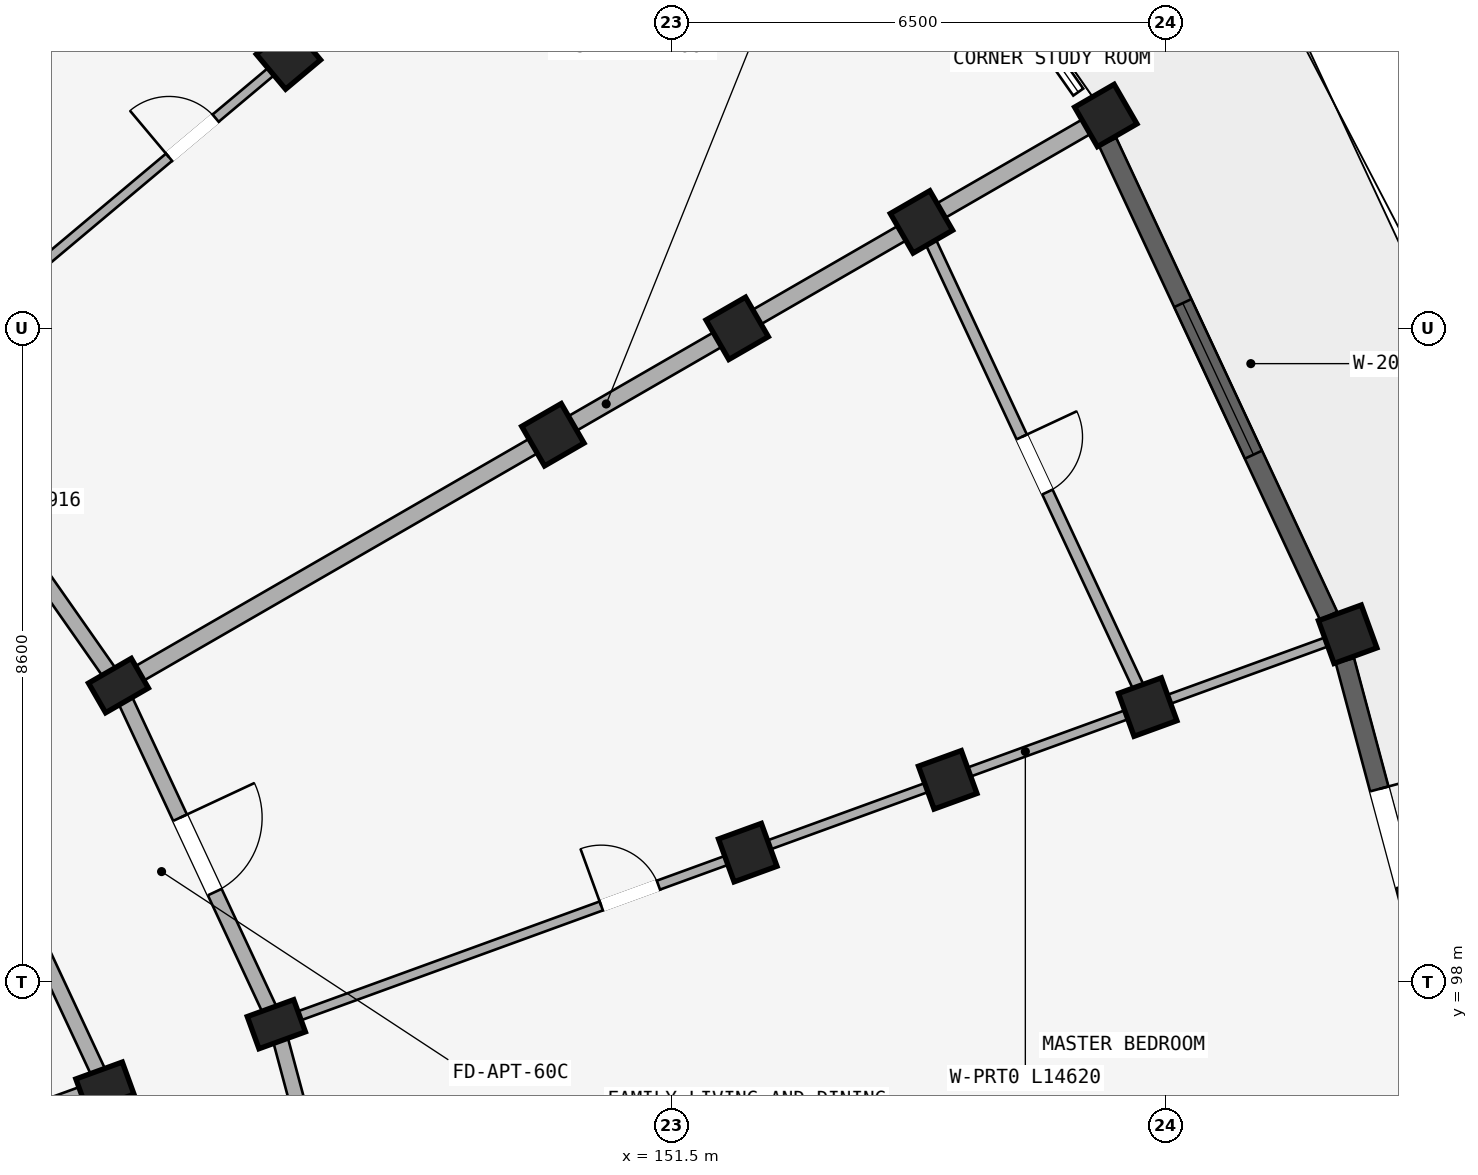
"""IFC4 building model, lengths in metres.
Left out: names, types, materials, properties, quantities, classifications, styles, units other than length and angle.
Written with IfcOpenShell. Run it as: python <this file> out.ifc"""

import sys

from ifc_helpers import new_model, si_unit, direction, frame, frame_2d, origin, origin_2d, place, context, subcontext, project, spatial, rectangle, extrude, element, fill, save


model = new_model("IFC4")
c1 = context("Model", 3, precision=1e-05, world=origin(), true_north=direction((0.0, 1.0)))
c2 = subcontext(c1, "Body", "Model", "MODEL_VIEW")
j1 = project(units=[si_unit("LENGTHUNIT", "METRE"), si_unit("PLANEANGLEUNIT", "RADIAN")], contexts=[c1])
p1 = place(None, origin())
s1 = spatial("IfcSite", under=j1, at=p1, CompositionType="ELEMENT")
p2 = place(p1, origin())
s2 = spatial("IfcBuilding", under=s1, at=p2, CompositionType="ELEMENT")
p3 = place(p2, frame((0.0, 0.0, 30.75)))
s3 = spatial("IfcBuildingStorey", under=s2, at=p3, CompositionType="ELEMENT", Elevation=30.75)
p4 = place(p3, frame((146.458, 110.169, 0.0), z_axis=(0.0, 0.0, 1.0), x_axis=(-0.642787609687, 0.766044443119, 0.0)))
e1 = element("IfcColumn", 1, at=p4, inside=s3, PredefinedType="COLUMN", context=c2, shape_type="SweptSolid", body=[
    extrude(rectangle(XDim=0.6, YDim=0.6, at=origin_2d()), origin(), (0.0, 0.0, 1.0), 2.93),
])
p5 = place(p3, frame((144.222, 101.9, 0.0), z_axis=(0.0, 0.0, 1.0), x_axis=(-0.5, 0.866025403784, 0.0)))
e2 = element("IfcColumn", 2, at=p5, inside=s3, PredefinedType="COLUMN", context=c2, shape_type="SweptSolid", body=[
    extrude(rectangle(XDim=0.45, YDim=0.65, at=origin_2d()), origin(), (0.0, 0.0, 1.0), 2.93),
])
for number, where, z_axis, x_axis in (
    (3, (149.938, 105.2, 0.0), (0.0, 0.0, 1.0), (-0.5, 0.866, 0.0)),
    (4, (152.363, 106.6, 0.0), (0.0, 0.0, 1.0), (-0.5, 0.866, 0.0)),
    (5, (154.787, 108.0, 0.0), (0.0, 0.0, 1.0), (-0.5, 0.866, 0.0)),
):
    element("IfcColumn", number, at=place(p3, frame(where, z_axis=z_axis, x_axis=x_axis)), inside=s3, PredefinedType="COLUMN", context=c2, shape_type="SweptSolid", body=[
        extrude(rectangle(XDim=0.6, YDim=0.6, at=origin_2d()), origin(), (0.0, 0.0, 1.0), 2.93),
    ])
p6 = place(p3, frame((157.212, 109.4, 0.0), z_axis=(0.0, 0.0, 1.0), x_axis=(-0.5, 0.866025403784, 0.0)))
e6 = element("IfcColumn", 6, at=p6, inside=s3, PredefinedType="COLUMN", context=c2, shape_type="SweptSolid", body=[
    extrude(rectangle(XDim=0.6, YDim=0.6, at=origin_2d()), origin(), (0.0, 0.0, 1.0), 2.97),
])
for number, where, z_axis, x_axis in (
    (7, (144.044, 96.624, 0.0), (0.0, 0.0, 1.0), (-0.342, 0.94, 0.0)),
    (8, (146.299, 97.445, 0.0), (0.0, 0.0, 1.0), (-0.342, 0.94, 0.0)),
):
    element("IfcColumn", number, at=place(p3, frame(where, z_axis=z_axis, x_axis=x_axis)), inside=s3, PredefinedType="COLUMN", context=c2, shape_type="SweptSolid", body=[
        extrude(rectangle(XDim=0.45, YDim=0.65, at=origin_2d()), origin(), (0.0, 0.0, 1.0), 2.93),
    ])
for number, where, z_axis, x_axis in (
    (9, (152.501, 99.702, 0.0), (0.0, 0.0, 1.0), (-0.342, 0.94, 0.0)),
    (10, (155.132, 100.66, 0.0), (0.0, 0.0, 1.0), (-0.342, 0.94, 0.0)),
    (11, (157.764, 101.618, 0.0), (0.0, 0.0, 1.0), (-0.342, 0.94, 0.0)),
):
    element("IfcColumn", number, at=place(p3, frame(where, z_axis=z_axis, x_axis=x_axis)), inside=s3, PredefinedType="COLUMN", context=c2, shape_type="SweptSolid", body=[
        extrude(rectangle(XDim=0.6, YDim=0.6, at=origin_2d()), origin(), (0.0, 0.0, 1.0), 2.93),
    ])
p7 = place(p3, frame((160.395, 102.575, 0.0), z_axis=(0.0, 0.0, 1.0), x_axis=(-0.342020143326, 0.939692620786, 0.0)))
e12 = element("IfcColumn", 12, at=p7, inside=s3, PredefinedType="COLUMN", context=c2, shape_type="SweptSolid", body=[
    extrude(rectangle(XDim=0.6, YDim=0.6, at=origin_2d()), origin(), (0.0, 0.0, 1.0), 2.97),
])
p8 = place(p3, frame((141.402, 105.927, 0.0), z_axis=(0.0, 0.0, 1.0), x_axis=(0.573592335331, -0.819140911474, 0.0)))
e13 = element("IfcWall", 13, at=p8, inside=s3, PredefinedType="STANDARD", context=c2, shape_type="SweptSolid", body=[
    extrude(rectangle(XDim=4.916, YDim=0.2, at=frame_2d((2.458, 0.0))), origin(), (0.0, 0.0, 1.0), 2.372),
])
p9 = place(p3, frame((142.144, 100.7, 0.0), z_axis=(0.0, 0.0, 1.0), x_axis=(0.422617978463, -0.906307919131, 0.0)))
e14 = element("IfcWall", 14, at=p9, inside=s3, PredefinedType="STANDARD", context=c2, shape_type="SweptSolid", body=[
    extrude(rectangle(XDim=4.497, YDim=0.2, at=frame_2d((2.249, 0.0))), origin(), (0.0, 0.0, 1.0), 2.372),
])
p10 = place(p3, frame((144.222, 101.9, 0.0), z_axis=(0.0, 0.0, 1.0), x_axis=(0.422629854778, -0.906302381024, 0.0)))
e15 = element("IfcWall", 15, at=p10, inside=s3, PredefinedType="STANDARD", context=c2, shape_type="SweptSolid", body=[
    extrude(rectangle(XDim=4.915, YDim=0.2, at=frame_2d((2.458, 0.0))), origin(), (0.0, 0.0, 1.0), 2.372),
])
p11 = place(p10, frame((1.918, 0.0, 0.0)))
e16 = element("IfcOpeningElement", 16, at=p11, cuts=e15, PredefinedType="OPENING", context=c2, shape_type="SweptSolid", body=[
    extrude(rectangle(XDim=1.08, YDim=2.15, at=frame_2d((0.54, 1.075))), frame((0.0, 0.11, 0.0), z_axis=(0.0, -1.0, 0.0), x_axis=(1.0, 0.0, 0.0)), (0.0, 0.0, 1.0), 0.22),
])
p12 = place(p3, frame((144.044, 96.624, 0.0), z_axis=(0.0, 0.0, 1.0), x_axis=(0.258787642463, -0.965934240054, 0.0)))
e17 = element("IfcWall", 17, at=p12, inside=s3, PredefinedType="STANDARD", context=c2, shape_type="SweptSolid", body=[
    extrude(rectangle(XDim=4.497, YDim=0.2, at=frame_2d((2.249, 0.0))), origin(), (0.0, 0.0, 1.0), 2.372),
])
p13 = place(p12, frame((1.729, 0.0, 0.0)))
e18 = element("IfcOpeningElement", 18, at=p13, cuts=e17, PredefinedType="OPENING", context=c2, shape_type="SweptSolid", body=[
    extrude(rectangle(XDim=1.04, YDim=2.15, at=frame_2d((0.52, 1.075))), frame((0.0, 0.11, 0.0), z_axis=(0.0, -1.0, 0.0), x_axis=(1.0, 0.0, 0.0)), (0.0, 0.0, 1.0), 0.22),
])
p14 = place(p3, frame((146.299, 97.445, 0.0), z_axis=(0.0, 0.0, 1.0), x_axis=(0.258803112091, -0.965930095386, 0.0)))
e19 = element("IfcWall", 19, at=p14, inside=s3, PredefinedType="STANDARD", context=c2, shape_type="SweptSolid", body=[
    extrude(rectangle(XDim=4.916, YDim=0.2, at=frame_2d((2.458, 0.0))), origin(), (0.0, 0.0, 1.0), 2.372),
])
p15 = place(p3, frame((137.991, 109.479, 0.0), z_axis=(0.0, 0.0, 1.0), x_axis=(0.642779216656, 0.76605148563, 0.0)))
e20 = element("IfcWall", 20, at=p15, inside=s3, PredefinedType="STANDARD", context=c2, shape_type="SweptSolid", body=[
    extrude(rectangle(XDim=14.62, YDim=0.22, at=frame_2d((7.31, 0.0))), origin(), (0.0, 0.0, 1.0), 2.372),
])
p16 = place(p3, frame((141.479, 105.991, 0.0), z_axis=(0.0, 0.0, 1.0), x_axis=(0.76605148563, 0.642779216656, 0.0)))
e21 = element("IfcWall", 21, at=p16, inside=s3, PredefinedType="PARTITIONING", context=c2, shape_type="SweptSolid", body=[
    extrude(rectangle(XDim=14.62, YDim=0.125, at=frame_2d((7.31, 0.0))), origin(), (0.0, 0.0, 1.0), 2.372),
])
p17 = place(p16, frame((4.449, 0.0, 0.0)))
e22 = element("IfcOpeningElement", 22, at=p17, cuts=e21, PredefinedType="OPENING", context=c2, shape_type="SweptSolid", body=[
    extrude(rectangle(XDim=0.8, YDim=2.1, at=frame_2d((0.4, 1.05))), frame((0.0, 0.073, 0.0), z_axis=(0.0, -1.0, 0.0), x_axis=(1.0, 0.0, 0.0)), (0.0, 0.0, 1.0), 0.145),
])
p18 = place(p3, frame((144.309, 101.95, 0.0), z_axis=(0.0, 0.0, 1.0), x_axis=(0.866020956416, 0.500007702989, 0.0)))
e23 = element("IfcWall", 23, at=p18, inside=s3, PredefinedType="STANDARD", context=c2, shape_type="SweptSolid", body=[
    extrude(rectangle(XDim=14.62, YDim=0.22, at=frame_2d((7.31, 0.0))), origin(), (0.0, 0.0, 1.0), 2.372),
])
p19 = place(p3, frame((137.654, 94.298, 0.0), z_axis=(0.0, 0.0, 1.0), x_axis=(0.939696231917, 0.342010221662, 0.0)))
e24 = element("IfcWall", 24, at=p19, inside=s3, PredefinedType="STANDARD", context=c2, shape_type="SweptSolid", body=[
    extrude(rectangle(XDim=6.75, YDim=0.22, at=frame_2d((3.375, 0.0))), origin(), (0.0, 0.0, 1.0), 2.372),
])
p20 = place(p3, frame((146.393, 97.479, 0.0), z_axis=(0.0, 0.0, 1.0), x_axis=(0.939694408106, 0.342015232663, 0.0)))
e25 = element("IfcWall", 25, at=p20, inside=s3, PredefinedType="PARTITIONING", context=c2, shape_type="SweptSolid", body=[
    extrude(rectangle(XDim=14.62, YDim=0.125, at=frame_2d((7.31, 0.0))), origin(), (0.0, 0.0, 1.0), 2.372),
])
p21 = place(p20, frame((4.449, 0.0, 0.0)))
e26 = element("IfcOpeningElement", 26, at=p21, cuts=e25, PredefinedType="OPENING", context=c2, shape_type="SweptSolid", body=[
    extrude(rectangle(XDim=0.8, YDim=2.1, at=frame_2d((0.4, 1.05))), frame((0.0, 0.073, 0.0), z_axis=(0.0, -1.0, 0.0), x_axis=(1.0, 0.0, 0.0)), (0.0, 0.0, 1.0), 0.145),
])
p22 = place(p3, frame((154.787, 108.0, 0.0), z_axis=(0.0, 0.0, 1.0), x_axis=(0.422640621205, -0.906297360311, 0.0)))
e27 = element("IfcWall", 27, at=p22, inside=s3, PredefinedType="PLUMBINGWALL", context=c2, shape_type="SweptSolid", body=[
    extrude(rectangle(XDim=7.042, YDim=0.15, at=frame_2d((3.521, 0.0))), origin(), (0.0, 0.0, 1.0), 2.372),
])
p23 = place(p22, frame((3.121, 0.0, 0.0)))
e28 = element("IfcOpeningElement", 28, at=p23, cuts=e27, PredefinedType="OPENING", context=c2, shape_type="SweptSolid", body=[
    extrude(rectangle(XDim=0.8, YDim=2.1, at=frame_2d((0.4, 1.05))), frame((0.0, 0.085, 0.0), z_axis=(0.0, -1.0, 0.0), x_axis=(1.0, 0.0, 0.0)), (0.0, 0.0, 1.0), 0.17),
])
p24 = place(p3, frame((157.237, 109.052, 0.0), z_axis=(0.0, 0.0, 1.0), x_axis=(0.422628979279, -0.906302789289, 0.0)))
e29 = element("IfcWall", 29, at=p24, inside=s3, PredefinedType="STANDARD", context=c2, shape_type="SweptSolid", body=[
    extrude(rectangle(XDim=6.879, YDim=0.25, at=frame_2d((3.439, 0.0))), origin(), (0.0, 0.0, 1.0), 2.412),
])
p25 = place(p24, frame((2.34, 0.0, 0.312)))
e30 = element("IfcOpeningElement", 30, at=p25, cuts=e29, PredefinedType="OPENING", context=c2, shape_type="SweptSolid", body=[
    extrude(rectangle(XDim=2.2, YDim=1.9, at=frame_2d((1.1, 0.95))), frame((0.0, 0.135, 0.0), z_axis=(0.0, -1.0, 0.0), x_axis=(1.0, 0.0, 0.0)), (0.0, 0.0, 1.0), 0.27),
])
p26 = place(p3, frame((160.358, 102.228, 0.0), z_axis=(0.0, 0.0, 1.0), x_axis=(0.258835428922, -0.965921436109, 0.0)))
e31 = element("IfcWall", 31, at=p26, inside=s3, PredefinedType="STANDARD", context=c2, shape_type="SweptSolid", body=[
    extrude(rectangle(XDim=6.879, YDim=0.25, at=frame_2d((3.439, 0.0))), origin(), (0.0, 0.0, 1.0), 2.412),
])
p27 = place(p26, frame((4.479, 0.0, 0.462)))
e32 = element("IfcOpeningElement", 32, at=p27, cuts=e31, PredefinedType="OPENING", context=c2, shape_type="SweptSolid", body=[
    extrude(rectangle(XDim=1.2, YDim=1.5, at=frame_2d((0.6, 0.75))), frame((0.0, 0.135, 0.0), z_axis=(0.0, -1.0, 0.0), x_axis=(1.0, 0.0, 0.0)), (0.0, 0.0, 1.0), 0.27),
])
p28 = place(p26, frame((1.748, 0.0, 0.0)))
e33 = element("IfcOpeningElement", 33, at=p28, cuts=e31, PredefinedType="OPENING", context=c2, shape_type="SweptSolid", body=[
    extrude(rectangle(XDim=1.32, YDim=2.15, at=frame_2d((0.66, 1.075))), frame((0.0, 0.135, 0.0), z_axis=(0.0, -1.0, 0.0), x_axis=(1.0, 0.0, 0.0)), (0.0, 0.0, 1.0), 0.27),
])
p29 = place(p25, origin())
e34 = element("IfcWindow", 34, at=p29, inside=s3, PartitioningType="TRIPLE_PANEL_VERTICAL", PredefinedType="WINDOW", context=c2, shape_type="SweptSolid", body=[
    extrude(rectangle(XDim=2.2, YDim=1.9, at=frame_2d((1.1, 0.95))), frame((0.0, 0.03, 0.0), z_axis=(0.0, -1.0, 0.0), x_axis=(1.0, 0.0, 0.0)), (0.0, 0.0, 1.0), 0.06),
])
fill(e30, e34)
p30 = place(p17, frame((0.8, 0.0, 0.0), z_axis=(0.0, 0.0, 1.0), x_axis=(-1.0, 0.0, 0.0)))
e35 = element("IfcDoor", 35, at=p30, inside=s3, OperationType="SINGLE_SWING_RIGHT", PredefinedType="DOOR", context=c2, shape_type="SweptSolid", body=[
    extrude(rectangle(XDim=0.8, YDim=2.1, at=frame_2d((0.4, 1.05))), frame((0.0, 0.025, 0.0), z_axis=(0.0, -1.0, 0.0), x_axis=(1.0, 0.0, 0.0)), (0.0, 0.0, 1.0), 0.05),
])
fill(e22, e35)
p31 = place(p21, frame((0.8, 0.0, 0.0), z_axis=(0.0, 0.0, 1.0), x_axis=(-1.0, 0.0, 0.0)))
e36 = element("IfcDoor", 36, at=p31, inside=s3, OperationType="SINGLE_SWING_RIGHT", PredefinedType="DOOR", context=c2, shape_type="SweptSolid", body=[
    extrude(rectangle(XDim=0.8, YDim=2.1, at=frame_2d((0.4, 1.05))), frame((0.0, 0.025, 0.0), z_axis=(0.0, -1.0, 0.0), x_axis=(1.0, 0.0, 0.0)), (0.0, 0.0, 1.0), 0.05),
])
fill(e26, e36)
p32 = place(p11, origin())
e37 = element("IfcDoor", 37, at=p32, inside=s3, OperationType="SINGLE_SWING_LEFT", PredefinedType="DOOR", context=c2, shape_type="SweptSolid", body=[
    extrude(rectangle(XDim=1.08, YDim=2.15, at=frame_2d((0.54, 1.075))), frame((0.0, 0.025, 0.0), z_axis=(0.0, -1.0, 0.0), x_axis=(1.0, 0.0, 0.0)), (0.0, 0.0, 1.0), 0.05),
])
fill(e16, e37)
p33 = place(p23, frame((0.8, 0.0, 0.0), z_axis=(0.0, 0.0, 1.0), x_axis=(-1.0, 0.0, 0.0)))
e38 = element("IfcDoor", 38, at=p33, inside=s3, OperationType="SINGLE_SWING_RIGHT", PredefinedType="DOOR", context=c2, shape_type="SweptSolid", body=[
    extrude(rectangle(XDim=0.8, YDim=2.1, at=frame_2d((0.4, 1.05))), frame((0.0, 0.025, 0.0), z_axis=(0.0, -1.0, 0.0), x_axis=(1.0, 0.0, 0.0)), (0.0, 0.0, 1.0), 0.05),
])
fill(e28, e38)
p34 = place(p28, origin())
e39 = element("IfcDoor", 39, at=p34, inside=s3, OperationType="SINGLE_SWING_LEFT", PredefinedType="DOOR", context=c2, shape_type="SweptSolid", body=[
    extrude(rectangle(XDim=1.32, YDim=2.15, at=frame_2d((0.66, 1.075))), frame((0.0, 0.025, 0.0), z_axis=(0.0, -1.0, 0.0), x_axis=(1.0, 0.0, 0.0)), (0.0, 0.0, 1.0), 0.05),
])
fill(e33, e39)
save(model, sys.argv[1])
